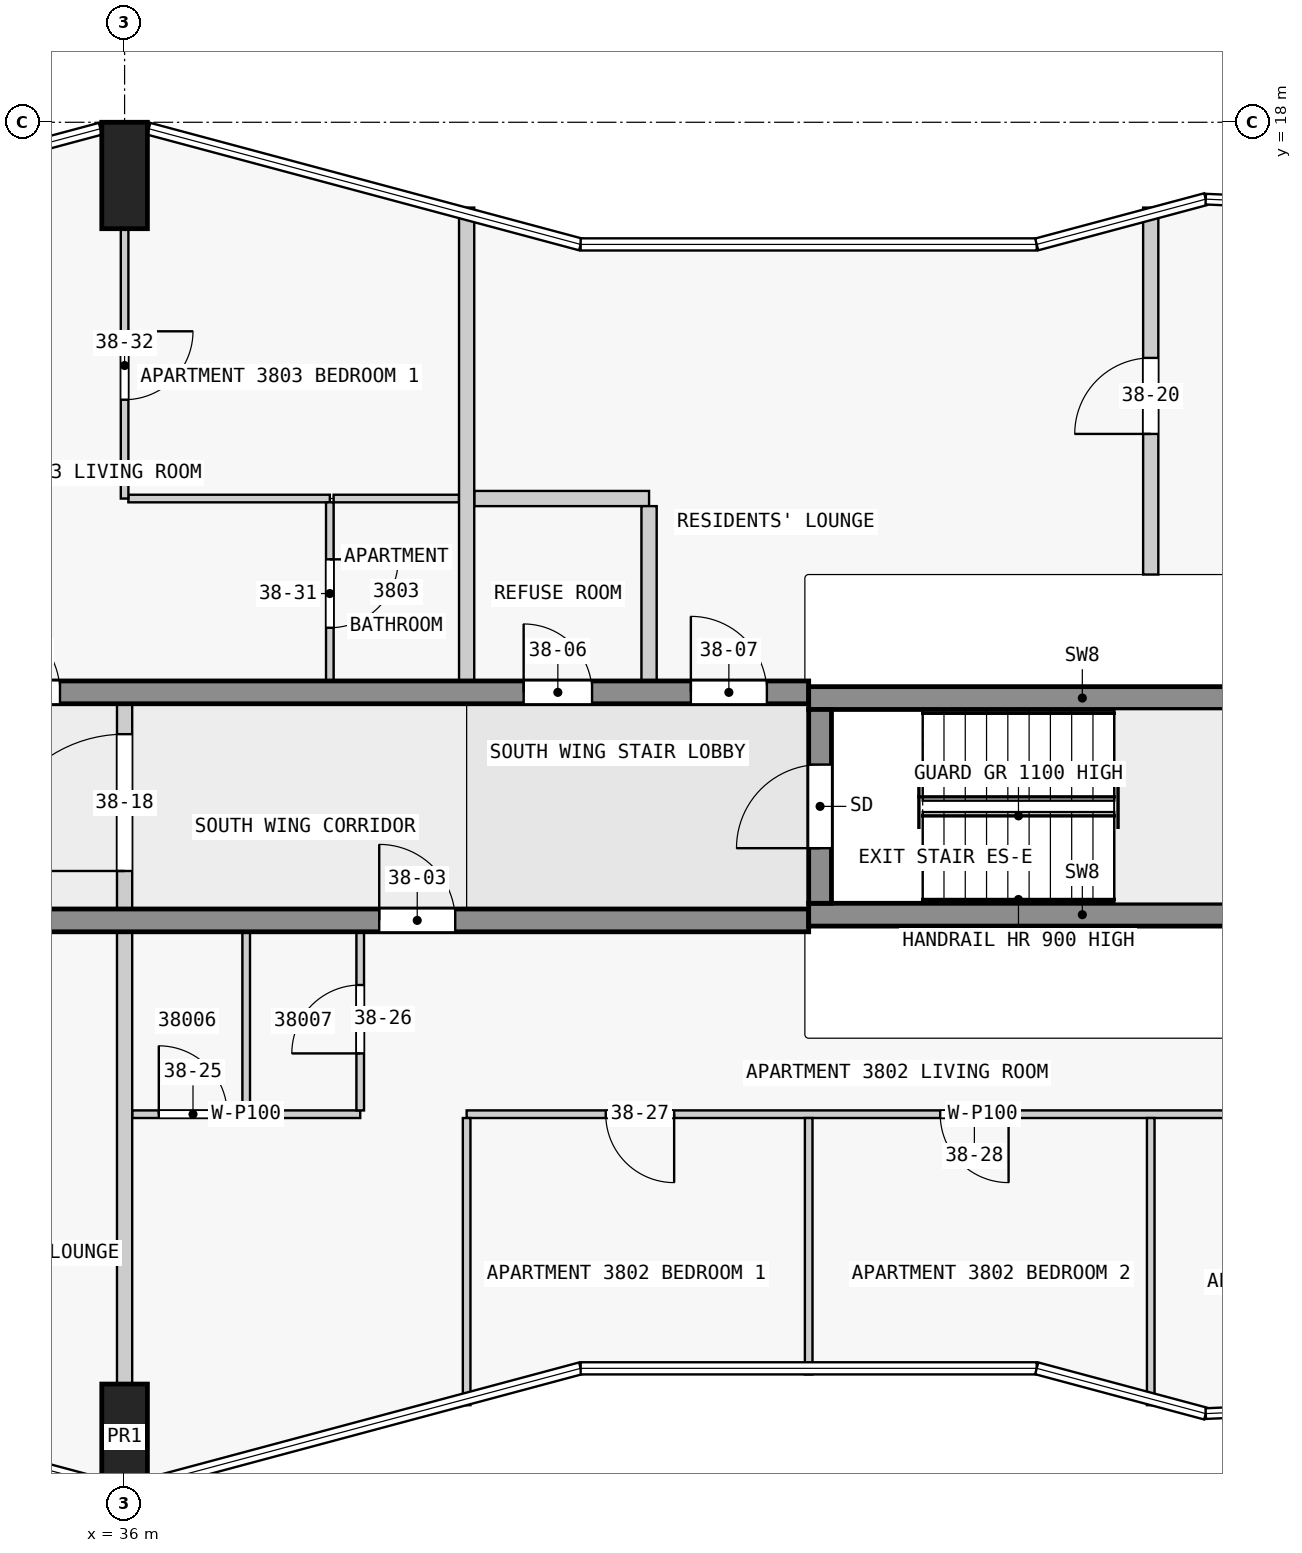
"""IFC4 building model, lengths in metres.
Left out: names, types, materials, properties, quantities, classifications, styles, units other than length and angle.
Written with IfcOpenShell. Run it as: python <this file> out.ifc"""

import sys

from ifc_helpers import new_model, si_unit, direction, frame, frame_2d, origin, origin_2d, place, context, subcontext, project, spatial, rectangle, extrude, element, fill, save


model = new_model("IFC4")
c1 = context("Model", 3, precision=1e-05, world=origin(), true_north=direction((0.0, 1.0)))
c2 = subcontext(c1, "Body", "Model", "MODEL_VIEW")
j1 = project(units=[si_unit("LENGTHUNIT", "METRE"), si_unit("PLANEANGLEUNIT", "RADIAN")], contexts=[c1])
p1 = place(None, origin())
s1 = spatial("IfcSite", under=j1, at=p1, CompositionType="ELEMENT")
p2 = place(p1, origin())
s2 = spatial("IfcBuilding", under=s1, at=p2, CompositionType="ELEMENT")
p3 = place(p2, frame((0.0, 0.0, 149.9)))
s3 = spatial("IfcBuildingStorey", under=s2, at=p3, CompositionType="ELEMENT", Elevation=149.9)
for number, where, z_axis, x_axis in (
    (1, (36.0, 0.7, 0.0), (0.0, 0.0, 1.0), (1.0, 0.0, 0.0)),
    (2, (36.0, 17.3, 0.0), (0.0, 0.0, 1.0), (1.0, 0.0, 0.0)),
):
    element("IfcColumn", number, at=place(p3, frame(where, z_axis=z_axis, x_axis=x_axis)), inside=s3, PredefinedType="COLUMN", context=c2, shape_type="SweptSolid", body=[
        extrude(rectangle(XDim=0.6, YDim=1.4, at=origin_2d()), origin(), (0.0, 0.0, 1.0), 3.5),
    ])
p4 = place(p3, frame((45.15, 7.725, 0.0), z_axis=(0.0, 0.0, 1.0), x_axis=(0.0, 1.0, 0.0)))
e3 = element("IfcWall", 3, at=p4, inside=s3, PredefinedType="SHEAR", context=c2, shape_type="SweptSolid", body=[
    extrude(rectangle(XDim=2.55, YDim=0.3, at=frame_2d((1.275, 0.0))), origin(), (0.0, 0.0, 1.0), 3.5),
])
p5 = place(p4, frame((0.725, 0.0, 0.0)))
e4 = element("IfcOpeningElement", 4, at=p5, cuts=e3, PredefinedType="OPENING", context=c2, shape_type="SweptSolid", body=[
    extrude(rectangle(XDim=1.1, YDim=2.1, at=frame_2d((0.55, 1.05))), frame((0.0, 0.16, 0.0), z_axis=(0.0, -1.0, 0.0), x_axis=(1.0, 0.0, 0.0)), (0.0, 0.0, 1.0), 0.32),
])
for number, where, z_axis, x_axis in (
    (5, (45.0, 7.575, 0.0), (0.0, 0.0, 1.0), (1.0, 0.0, 0.0)),
    (6, (45.0, 10.425, 0.0), (0.0, 0.0, 1.0), (1.0, 0.0, 0.0)),
):
    element("IfcWall", number, at=place(p3, frame(where, z_axis=z_axis, x_axis=x_axis)), inside=s3, PredefinedType="SHEAR", context=c2, shape_type="SweptSolid", body=[
        extrude(rectangle(XDim=7.2, YDim=0.3, at=frame_2d((3.6, 0.0))), origin(), (0.0, 0.0, 1.0), 3.5),
    ])
p6 = place(p3, frame((22.5, 7.5, 0.0), z_axis=(0.0, 0.0, 1.0), x_axis=(1.0, 0.0, 0.0)))
e7 = element("IfcWall", 7, at=p6, inside=s3, PredefinedType="SHEAR", context=c2, shape_type="SweptSolid", body=[
    extrude(rectangle(XDim=22.5, YDim=0.3, at=frame_2d((11.25, 0.0))), origin(), (0.0, 0.0, 1.0), 3.25),
])
p7 = place(p6, frame((4.05, 0.0, 0.0)))
e8 = element("IfcOpeningElement", 8, at=p7, cuts=e7, PredefinedType="OPENING", context=c2, shape_type="SweptSolid", body=[
    extrude(rectangle(XDim=1.0, YDim=2.1, at=frame_2d((0.5, 1.05))), frame((0.0, 0.16, 0.0), z_axis=(0.0, -1.0, 0.0), x_axis=(1.0, 0.0, 0.0)), (0.0, 0.0, 1.0), 0.32),
])
p8 = place(p6, frame((10.35, 0.0, 0.0)))
e9 = element("IfcOpeningElement", 9, at=p8, cuts=e7, PredefinedType="OPENING", context=c2, shape_type="SweptSolid", body=[
    extrude(rectangle(XDim=1.8, YDim=2.1, at=frame_2d((0.9, 1.05))), frame((0.0, 0.16, 0.0), z_axis=(0.0, -1.0, 0.0), x_axis=(1.0, 0.0, 0.0)), (0.0, 0.0, 1.0), 0.32),
])
p9 = place(p6, frame((16.85, 0.0, 0.0)))
e10 = element("IfcOpeningElement", 10, at=p9, cuts=e7, PredefinedType="OPENING", context=c2, shape_type="SweptSolid", body=[
    extrude(rectangle(XDim=1.0, YDim=2.1, at=frame_2d((0.5, 1.05))), frame((0.0, 0.16, 0.0), z_axis=(0.0, -1.0, 0.0), x_axis=(1.0, 0.0, 0.0)), (0.0, 0.0, 1.0), 0.32),
])
p10 = place(p3, frame((22.5, 10.5, 0.0), z_axis=(0.0, 0.0, 1.0), x_axis=(1.0, 0.0, 0.0)))
e11 = element("IfcWall", 11, at=p10, inside=s3, PredefinedType="SHEAR", context=c2, shape_type="SweptSolid", body=[
    extrude(rectangle(XDim=22.5, YDim=0.3, at=frame_2d((11.25, 0.0))), origin(), (0.0, 0.0, 1.0), 3.25),
])
p11 = place(p10, frame((4.05, 0.0, 0.0)))
e12 = element("IfcOpeningElement", 12, at=p11, cuts=e11, PredefinedType="OPENING", context=c2, shape_type="SweptSolid", body=[
    extrude(rectangle(XDim=1.0, YDim=2.1, at=frame_2d((0.5, 1.05))), frame((0.0, 0.16, 0.0), z_axis=(0.0, -1.0, 0.0), x_axis=(1.0, 0.0, 0.0)), (0.0, 0.0, 1.0), 0.32),
])
p12 = place(p10, frame((11.65, 0.0, 0.0)))
e13 = element("IfcOpeningElement", 13, at=p12, cuts=e11, PredefinedType="OPENING", context=c2, shape_type="SweptSolid", body=[
    extrude(rectangle(XDim=1.0, YDim=2.1, at=frame_2d((0.5, 1.05))), frame((0.0, 0.16, 0.0), z_axis=(0.0, -1.0, 0.0), x_axis=(1.0, 0.0, 0.0)), (0.0, 0.0, 1.0), 0.32),
])
p13 = place(p10, frame((18.75, 0.0, 0.0)))
e14 = element("IfcOpeningElement", 14, at=p13, cuts=e11, PredefinedType="OPENING", context=c2, shape_type="SweptSolid", body=[
    extrude(rectangle(XDim=0.9, YDim=2.1, at=frame_2d((0.45, 1.05))), frame((0.0, 0.16, 0.0), z_axis=(0.0, -1.0, 0.0), x_axis=(1.0, 0.0, 0.0)), (0.0, 0.0, 1.0), 0.32),
])
p14 = place(p10, frame((20.95, 0.0, 0.0)))
e15 = element("IfcOpeningElement", 15, at=p14, cuts=e11, PredefinedType="OPENING", context=c2, shape_type="SweptSolid", body=[
    extrude(rectangle(XDim=1.0, YDim=2.1, at=frame_2d((0.5, 1.05))), frame((0.0, 0.16, 0.0), z_axis=(0.0, -1.0, 0.0), x_axis=(1.0, 0.0, 0.0)), (0.0, 0.0, 1.0), 0.32),
])
p15 = place(p3, frame((54.08, 4.95, 0.0), z_axis=(0.0, 0.0, 1.0), x_axis=(-1.0, 0.0, 0.0)))
e16 = element("IfcWall", 16, at=p15, inside=s3, PredefinedType="PARTITIONING", context=c2, shape_type="SweptSolid", body=[
    extrude(rectangle(XDim=13.58, YDim=0.1, at=frame_2d((6.79, 0.0))), origin(), (0.0, 0.0, 1.0), 3.25),
])
p16 = place(p15, frame((10.85, 0.0, 0.0)))
e17 = element("IfcOpeningElement", 17, at=p16, cuts=e16, PredefinedType="OPENING", context=c2, shape_type="SweptSolid", body=[
    extrude(rectangle(XDim=0.9, YDim=2.1, at=frame_2d((0.45, 1.05))), frame((0.0, 0.06, 0.0), z_axis=(0.0, -1.0, 0.0), x_axis=(1.0, 0.0, 0.0)), (0.0, 0.0, 1.0), 0.12),
])
p17 = place(p15, frame((6.45, 0.0, 0.0)))
e18 = element("IfcOpeningElement", 18, at=p17, cuts=e16, PredefinedType="OPENING", context=c2, shape_type="SweptSolid", body=[
    extrude(rectangle(XDim=0.9, YDim=2.1, at=frame_2d((0.45, 1.05))), frame((0.0, 0.06, 0.0), z_axis=(0.0, -1.0, 0.0), x_axis=(1.0, 0.0, 0.0)), (0.0, 0.0, 1.0), 0.12),
])
p18 = place(p15, frame((1.95, 0.0, 0.0)))
e19 = element("IfcOpeningElement", 19, at=p18, cuts=e16, PredefinedType="OPENING", context=c2, shape_type="SweptSolid", body=[
    extrude(rectangle(XDim=0.9, YDim=2.1, at=frame_2d((0.45, 1.05))), frame((0.0, 0.06, 0.0), z_axis=(0.0, -1.0, 0.0), x_axis=(1.0, 0.0, 0.0)), (0.0, 0.0, 1.0), 0.12),
])
p19 = place(p3, frame((36.1, 4.95, 0.0), z_axis=(0.0, 0.0, 1.0), x_axis=(1.0, 0.0, 0.0)))
e20 = element("IfcWall", 20, at=p19, inside=s3, PredefinedType="PARTITIONING", context=c2, shape_type="SweptSolid", body=[
    extrude(rectangle(XDim=3.0, YDim=0.1, at=frame_2d((1.5, 0.0))), origin(), (0.0, 0.0, 1.0), 3.25),
])
p20 = place(p19, frame((0.35, 0.0, 0.0)))
e21 = element("IfcOpeningElement", 21, at=p20, cuts=e20, PredefinedType="OPENING", context=c2, shape_type="SweptSolid", body=[
    extrude(rectangle(XDim=0.9, YDim=2.1, at=frame_2d((0.45, 1.05))), frame((0.0, 0.06, 0.0), z_axis=(0.0, -1.0, 0.0), x_axis=(1.0, 0.0, 0.0)), (0.0, 0.0, 1.0), 0.12),
])
p21 = place(p3, frame((40.4, 13.05, 0.0), z_axis=(0.0, 0.0, 1.0), x_axis=(-1.0, 0.0, 0.0)))
e22 = element("IfcWall", 22, at=p21, inside=s3, PredefinedType="PARTITIONING", context=c2, shape_type="SweptSolid", body=[
    extrude(rectangle(XDim=1.65, YDim=0.1, at=frame_2d((0.825, 0.0))), origin(), (0.0, 0.0, 1.0), 3.25),
])
p22 = place(p3, frame((36.05, 13.05, 0.0), z_axis=(0.0, 0.0, 1.0), x_axis=(1.0, 0.0, 0.0)))
e23 = element("IfcWall", 23, at=p22, inside=s3, PredefinedType="PARTITIONING", context=c2, shape_type="SweptSolid", body=[
    extrude(rectangle(XDim=2.65, YDim=0.1, at=frame_2d((1.325, 0.0))), origin(), (0.0, 0.0, 1.0), 3.25),
])
p23 = place(p3, frame((42.9, 13.05, 0.0), z_axis=(0.0, 0.0, 1.0), x_axis=(-1.0, 0.0, 0.0)))
e24 = element("IfcWall", 24, at=p23, inside=s3, PredefinedType="PARTITIONING", context=c2, shape_type="SweptSolid", body=[
    extrude(rectangle(XDim=2.3, YDim=0.2, at=frame_2d((1.15, 0.0))), origin(), (0.0, 0.0, 1.0), 3.25),
])
p24 = place(p3, frame((36.0, 16.6, 0.0), z_axis=(0.0, 0.0, 1.0), x_axis=(0.0, -1.0, 0.0)))
e25 = element("IfcWall", 25, at=p24, inside=s3, PredefinedType="PARTITIONING", context=c2, shape_type="SweptSolid", body=[
    extrude(rectangle(XDim=3.55, YDim=0.1, at=frame_2d((1.775, 0.0))), origin(), (0.0, 0.0, 1.0), 3.25),
])
p25 = place(p24, frame((1.35, 0.0, 0.0)))
e26 = element("IfcOpeningElement", 26, at=p25, cuts=e25, PredefinedType="OPENING", context=c2, shape_type="SweptSolid", body=[
    extrude(rectangle(XDim=0.9, YDim=2.1, at=frame_2d((0.45, 1.05))), frame((0.0, 0.06, 0.0), z_axis=(0.0, -1.0, 0.0), x_axis=(1.0, 0.0, 0.0)), (0.0, 0.0, 1.0), 0.12),
])
p26 = place(p3, frame((36.0, 1.4, 0.0), z_axis=(0.0, 0.0, 1.0), x_axis=(0.0, 1.0, 0.0)))
e27 = element("IfcWall", 27, at=p26, inside=s3, PredefinedType="PARTITIONING", context=c2, shape_type="SweptSolid", body=[
    extrude(rectangle(XDim=5.95, YDim=0.2, at=frame_2d((2.975, 0.0))), origin(), (0.0, 0.0, 1.0), 3.25),
])
p27 = place(p3, frame((37.6, 5.0, 0.0), z_axis=(0.0, 0.0, 1.0), x_axis=(0.0, 1.0, 0.0)))
e28 = element("IfcWall", 28, at=p27, inside=s3, PredefinedType="PARTITIONING", context=c2, shape_type="SweptSolid", body=[
    extrude(rectangle(XDim=2.35, YDim=0.1, at=frame_2d((1.175, 0.0))), origin(), (0.0, 0.0, 1.0), 3.25),
])
p28 = place(p3, frame((38.7, 13.0, 0.0), z_axis=(0.0, 0.0, 1.0), x_axis=(0.0, -1.0, 0.0)))
e29 = element("IfcWall", 29, at=p28, inside=s3, PredefinedType="PARTITIONING", context=c2, shape_type="SweptSolid", body=[
    extrude(rectangle(XDim=2.35, YDim=0.1, at=frame_2d((1.175, 0.0))), origin(), (0.0, 0.0, 1.0), 3.25),
])
p29 = place(p28, frame((0.75, 0.0, 0.0)))
e30 = element("IfcOpeningElement", 30, at=p29, cuts=e29, PredefinedType="OPENING", context=c2, shape_type="SweptSolid", body=[
    extrude(rectangle(XDim=0.9, YDim=2.1, at=frame_2d((0.45, 1.05))), frame((0.0, 0.06, 0.0), z_axis=(0.0, -1.0, 0.0), x_axis=(1.0, 0.0, 0.0)), (0.0, 0.0, 1.0), 0.12),
])
p30 = place(p3, frame((39.1, 5.0, 0.0), z_axis=(0.0, 0.0, 1.0), x_axis=(0.0, 1.0, 0.0)))
e31 = element("IfcWall", 31, at=p30, inside=s3, PredefinedType="PARTITIONING", context=c2, shape_type="SweptSolid", body=[
    extrude(rectangle(XDim=2.35, YDim=0.1, at=frame_2d((1.175, 0.0))), origin(), (0.0, 0.0, 1.0), 3.25),
])
p31 = place(p30, frame((0.75, 0.0, 0.0)))
e32 = element("IfcOpeningElement", 32, at=p31, cuts=e31, PredefinedType="OPENING", context=c2, shape_type="SweptSolid", body=[
    extrude(rectangle(XDim=0.9, YDim=2.1, at=frame_2d((0.45, 1.05))), frame((0.0, 0.06, 0.0), z_axis=(0.0, -1.0, 0.0), x_axis=(1.0, 0.0, 0.0)), (0.0, 0.0, 1.0), 0.12),
])
p32 = place(p3, frame((40.5, 4.9, 0.0), z_axis=(0.0, 0.0, 1.0), x_axis=(0.0, -1.0, 0.0)))
e33 = element("IfcWall", 33, at=p32, inside=s3, PredefinedType="PARTITIONING", context=c2, shape_type="SweptSolid", body=[
    extrude(rectangle(XDim=3.778, YDim=0.1, at=frame_2d((1.889, 0.0))), origin(), (0.0, 0.0, 1.0), 3.25),
])
p33 = place(p3, frame((40.5, 10.65, 0.0), z_axis=(0.0, 0.0, 1.0), x_axis=(0.0, 1.0, 0.0)))
e34 = element("IfcWall", 34, at=p33, inside=s3, PredefinedType="PARTITIONING", context=c2, shape_type="SweptSolid", body=[
    extrude(rectangle(XDim=6.228, YDim=0.2, at=frame_2d((3.114, 0.0))), origin(), (0.0, 0.0, 1.0), 3.25),
])
p34 = place(p3, frame((42.9, 10.65, 0.0), z_axis=(0.0, 0.0, 1.0), x_axis=(0.0, 1.0, 0.0)))
e35 = element("IfcWall", 35, at=p34, inside=s3, PredefinedType="PARTITIONING", context=c2, shape_type="SweptSolid", body=[
    extrude(rectangle(XDim=2.3, YDim=0.2, at=frame_2d((1.15, 0.0))), origin(), (0.0, 0.0, 1.0), 3.25),
])
p35 = place(p3, frame((45.0, 1.527, 0.0), z_axis=(0.0, 0.0, 1.0), x_axis=(0.0, 1.0, 0.0)))
e36 = element("IfcWall", 36, at=p35, inside=s3, PredefinedType="PARTITIONING", context=c2, shape_type="SweptSolid", body=[
    extrude(rectangle(XDim=3.373, YDim=0.1, at=frame_2d((1.687, 0.0))), origin(), (0.0, 0.0, 1.0), 3.25),
])
p36 = place(p3, frame((49.5, 1.122, 0.0), z_axis=(0.0, 0.0, 1.0), x_axis=(0.0, 1.0, 0.0)))
e37 = element("IfcWall", 37, at=p36, inside=s3, PredefinedType="PARTITIONING", context=c2, shape_type="SweptSolid", body=[
    extrude(rectangle(XDim=3.778, YDim=0.1, at=frame_2d((1.889, 0.0))), origin(), (0.0, 0.0, 1.0), 3.25),
])
p37 = place(p3, frame((49.5, 12.05, 0.0), z_axis=(0.0, 0.0, 1.0), x_axis=(0.0, 1.0, 0.0)))
e38 = element("IfcWall", 38, at=p37, inside=s3, PredefinedType="PARTITIONING", context=c2, shape_type="SweptSolid", body=[
    extrude(rectangle(XDim=4.828, YDim=0.2, at=frame_2d((2.414, 0.0))), origin(), (0.0, 0.0, 1.0), 3.25),
])
p38 = place(p37, frame((1.85, 0.0, 0.0)))
e39 = element("IfcOpeningElement", 39, at=p38, cuts=e38, PredefinedType="OPENING", context=c2, shape_type="SweptSolid", body=[
    extrude(rectangle(XDim=1.0, YDim=2.1, at=frame_2d((0.5, 1.05))), frame((0.0, 0.11, 0.0), z_axis=(0.0, -1.0, 0.0), x_axis=(1.0, 0.0, 0.0)), (0.0, 0.0, 1.0), 0.22),
])
p39 = place(p3, frame((36.0, 7.45, 0.0), z_axis=(0.0, 0.0, 1.0), x_axis=(0.0, 1.0, 0.0)))
e40 = element("IfcWall", 40, at=p39, inside=s3, PredefinedType="PARTITIONING", context=c2, shape_type="SweptSolid", body=[
    extrude(rectangle(XDim=3.2, YDim=0.2, at=frame_2d((1.6, 0.0))), origin(), (0.0, 0.0, 1.0), 3.25),
])
p40 = place(p39, frame((0.7, 0.0, 0.0)))
e41 = element("IfcOpeningElement", 41, at=p40, cuts=e40, PredefinedType="OPENING", context=c2, shape_type="SweptSolid", body=[
    extrude(rectangle(XDim=1.8, YDim=2.1, at=frame_2d((0.9, 1.05))), frame((0.0, 0.11, 0.0), z_axis=(0.0, -1.0, 0.0), x_axis=(1.0, 0.0, 0.0)), (0.0, 0.0, 1.0), 0.22),
])
p41 = place(p5, origin())
e42 = element("IfcDoor", 42, at=p41, inside=s3, OperationType="SINGLE_SWING_LEFT", PredefinedType="DOOR", context=c2, shape_type="SweptSolid", body=[
    extrude(rectangle(XDim=1.1, YDim=2.1, at=frame_2d((0.55, 1.05))), frame((0.0, 0.025, 0.0), z_axis=(0.0, -1.0, 0.0), x_axis=(1.0, 0.0, 0.0)), (0.0, 0.0, 1.0), 0.05),
])
fill(e4, e42)
p42 = place(p9, origin())
e43 = element("IfcDoor", 43, at=p42, inside=s3, OperationType="SINGLE_SWING_RIGHT", PredefinedType="DOOR", context=c2, shape_type="SweptSolid", body=[
    extrude(rectangle(XDim=1.0, YDim=2.1, at=frame_2d((0.5, 1.05))), frame((0.0, 0.025, 0.0), z_axis=(0.0, -1.0, 0.0), x_axis=(1.0, 0.0, 0.0)), (0.0, 0.0, 1.0), 0.05),
])
fill(e10, e43)
p43 = place(p12, origin())
e44 = element("IfcDoor", 44, at=p43, inside=s3, OperationType="SINGLE_SWING_RIGHT", PredefinedType="DOOR", context=c2, shape_type="SweptSolid", body=[
    extrude(rectangle(XDim=1.0, YDim=2.1, at=frame_2d((0.5, 1.05))), frame((0.0, 0.025, 0.0), z_axis=(0.0, -1.0, 0.0), x_axis=(1.0, 0.0, 0.0)), (0.0, 0.0, 1.0), 0.05),
])
fill(e13, e44)
p44 = place(p13, origin())
e45 = element("IfcDoor", 45, at=p44, inside=s3, OperationType="SINGLE_SWING_RIGHT", PredefinedType="DOOR", context=c2, shape_type="SweptSolid", body=[
    extrude(rectangle(XDim=0.9, YDim=2.1, at=frame_2d((0.45, 1.05))), frame((0.0, 0.025, 0.0), z_axis=(0.0, -1.0, 0.0), x_axis=(1.0, 0.0, 0.0)), (0.0, 0.0, 1.0), 0.05),
])
fill(e14, e45)
p45 = place(p14, origin())
e46 = element("IfcDoor", 46, at=p45, inside=s3, OperationType="SINGLE_SWING_RIGHT", PredefinedType="DOOR", context=c2, shape_type="SweptSolid", body=[
    extrude(rectangle(XDim=1.0, YDim=2.1, at=frame_2d((0.5, 1.05))), frame((0.0, 0.025, 0.0), z_axis=(0.0, -1.0, 0.0), x_axis=(1.0, 0.0, 0.0)), (0.0, 0.0, 1.0), 0.05),
])
fill(e15, e46)
p46 = place(p40, origin())
e47 = element("IfcDoor", 47, at=p46, inside=s3, OperationType="SINGLE_SWING_LEFT", PredefinedType="DOOR", context=c2, shape_type="SweptSolid", body=[
    extrude(rectangle(XDim=1.8, YDim=2.1, at=frame_2d((0.9, 1.05))), frame((0.0, 0.025, 0.0), z_axis=(0.0, -1.0, 0.0), x_axis=(1.0, 0.0, 0.0)), (0.0, 0.0, 1.0), 0.05),
])
fill(e41, e47)
p47 = place(p38, origin())
e48 = element("IfcDoor", 48, at=p47, inside=s3, OperationType="SINGLE_SWING_LEFT", PredefinedType="DOOR", context=c2, shape_type="SweptSolid", body=[
    extrude(rectangle(XDim=1.0, YDim=2.1, at=frame_2d((0.5, 1.05))), frame((0.0, 0.025, 0.0), z_axis=(0.0, -1.0, 0.0), x_axis=(1.0, 0.0, 0.0)), (0.0, 0.0, 1.0), 0.05),
])
fill(e39, e48)
p48 = place(p20, origin())
e49 = element("IfcDoor", 49, at=p48, inside=s3, OperationType="SINGLE_SWING_LEFT", PredefinedType="DOOR", context=c2, shape_type="SweptSolid", body=[
    extrude(rectangle(XDim=0.9, YDim=2.1, at=frame_2d((0.45, 1.05))), frame((0.0, 0.025, 0.0), z_axis=(0.0, -1.0, 0.0), x_axis=(1.0, 0.0, 0.0)), (0.0, 0.0, 1.0), 0.05),
])
fill(e21, e49)
p49 = place(p31, origin())
e50 = element("IfcDoor", 50, at=p49, inside=s3, OperationType="SINGLE_SWING_RIGHT", PredefinedType="DOOR", context=c2, shape_type="SweptSolid", body=[
    extrude(rectangle(XDim=0.9, YDim=2.1, at=frame_2d((0.45, 1.05))), frame((0.0, 0.025, 0.0), z_axis=(0.0, -1.0, 0.0), x_axis=(1.0, 0.0, 0.0)), (0.0, 0.0, 1.0), 0.05),
])
fill(e32, e50)
p50 = place(p16, origin())
e51 = element("IfcDoor", 51, at=p50, inside=s3, OperationType="SINGLE_SWING_RIGHT", PredefinedType="DOOR", context=c2, shape_type="SweptSolid", body=[
    extrude(rectangle(XDim=0.9, YDim=2.1, at=frame_2d((0.45, 1.05))), frame((0.0, 0.025, 0.0), z_axis=(0.0, -1.0, 0.0), x_axis=(1.0, 0.0, 0.0)), (0.0, 0.0, 1.0), 0.05),
])
fill(e17, e51)
p51 = place(p17, origin())
e52 = element("IfcDoor", 52, at=p51, inside=s3, OperationType="SINGLE_SWING_RIGHT", PredefinedType="DOOR", context=c2, shape_type="SweptSolid", body=[
    extrude(rectangle(XDim=0.9, YDim=2.1, at=frame_2d((0.45, 1.05))), frame((0.0, 0.025, 0.0), z_axis=(0.0, -1.0, 0.0), x_axis=(1.0, 0.0, 0.0)), (0.0, 0.0, 1.0), 0.05),
])
fill(e18, e52)
p52 = place(p29, origin())
e53 = element("IfcDoor", 53, at=p52, inside=s3, OperationType="SINGLE_SWING_RIGHT", PredefinedType="DOOR", context=c2, shape_type="SweptSolid", body=[
    extrude(rectangle(XDim=0.9, YDim=2.1, at=frame_2d((0.45, 1.05))), frame((0.0, 0.025, 0.0), z_axis=(0.0, -1.0, 0.0), x_axis=(1.0, 0.0, 0.0)), (0.0, 0.0, 1.0), 0.05),
])
fill(e30, e53)
p53 = place(p25, origin())
e54 = element("IfcDoor", 54, at=p53, inside=s3, OperationType="SINGLE_SWING_RIGHT", PredefinedType="DOOR", context=c2, shape_type="SweptSolid", body=[
    extrude(rectangle(XDim=0.9, YDim=2.1, at=frame_2d((0.45, 1.05))), frame((0.0, 0.025, 0.0), z_axis=(0.0, -1.0, 0.0), x_axis=(1.0, 0.0, 0.0)), (0.0, 0.0, 1.0), 0.05),
])
fill(e26, e54)
save(model, sys.argv[1])
